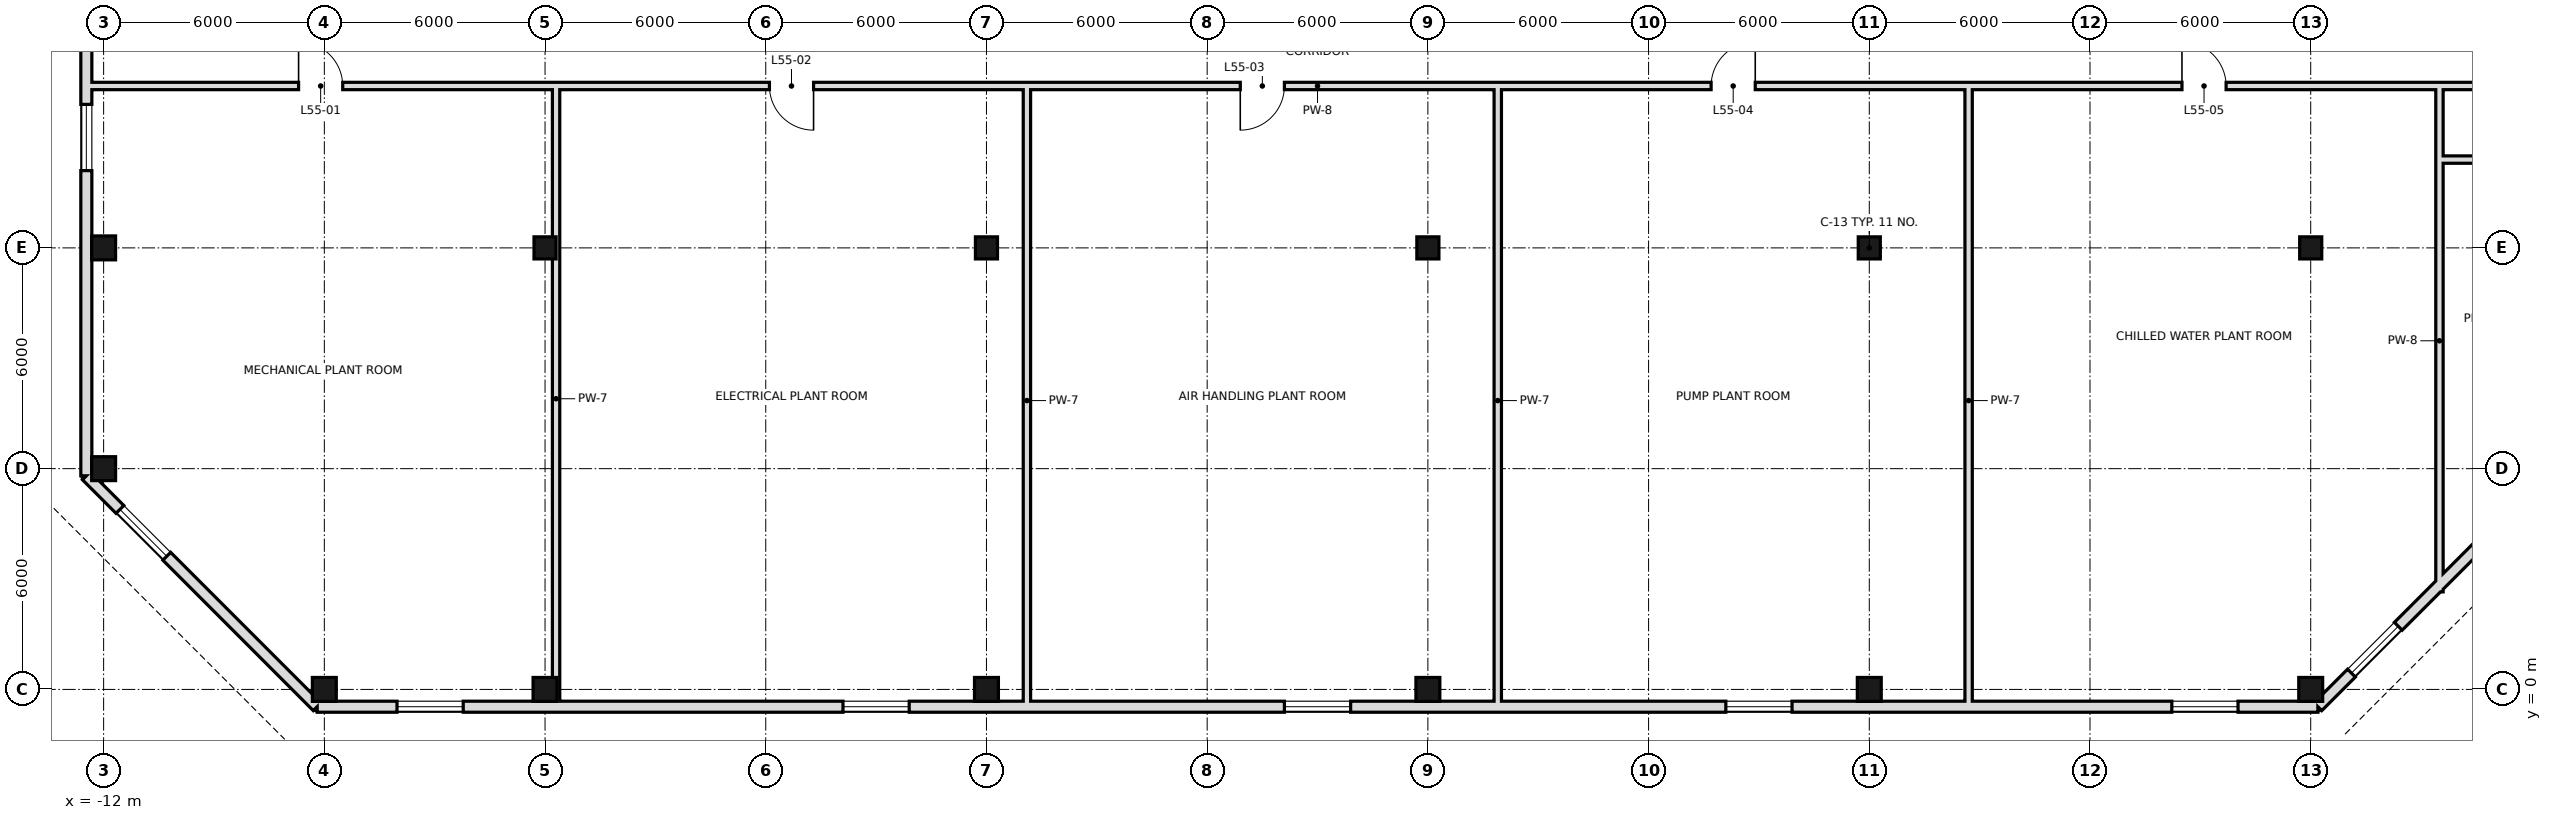
"""IFC4 building model, lengths in metres.
Left out: names, types, materials, properties, quantities, classifications, styles, units other than length and angle.
Written with IfcOpenShell. Run it as: python <this file> out.ifc"""

import sys

from ifc_helpers import new_model, si_unit, direction, frame, frame_2d, origin, origin_2d, place, context, subcontext, project, spatial, rectangle, hollow_rectangle, extrude, element, fill, save


model = new_model("IFC4")
c1 = context("Model", 3, precision=1e-05, world=origin(), true_north=direction((0.0, 1.0)))
c2 = subcontext(c1, "Body", "Model", "MODEL_VIEW")
j1 = project(units=[si_unit("LENGTHUNIT", "METRE"), si_unit("PLANEANGLEUNIT", "RADIAN")], contexts=[c1])
p1 = place(None, origin())
s1 = spatial("IfcSite", under=j1, at=p1, CompositionType="ELEMENT")
p2 = place(p1, origin())
s2 = spatial("IfcBuilding", under=s1, at=p2, CompositionType="ELEMENT")
p3 = place(p2, frame((0.0, 0.0, 234.2)))
s3 = spatial("IfcBuildingStorey", under=s2, at=p3, CompositionType="ELEMENT", Elevation=234.2)
for number, where, z_axis, x_axis in (
    (1, (-12.0, 6.0, 0.0), (0.0, 0.0, 1.0), (1.0, 0.0, 0.0)),
    (2, (-12.0, 12.0, 0.0), (0.0, 0.0, 1.0), (1.0, 0.0, 0.0)),
    (3, (-6.0, 0.0, 0.0), (0.0, 0.0, 1.0), (1.0, 0.0, 0.0)),
    (4, (0.0, 0.0, 0.0), (0.0, 0.0, 1.0), (1.0, 0.0, 0.0)),
):
    element("IfcColumn", number, at=place(p3, frame(where, z_axis=z_axis, x_axis=x_axis)), inside=s3, PredefinedType="COLUMN", context=c2, shape_type="SweptSolid", body=[
        extrude(hollow_rectangle(XDim=0.65, YDim=0.65, WallThickness=0.032, at=origin_2d()), origin(), (0.0, 0.0, 1.0), 5.4),
    ])
p4 = place(p3, frame((0.0, 12.0, 0.0), z_axis=(0.0, 0.0, 1.0), x_axis=(1.0, 0.0, 0.0)))
e5 = element("IfcColumn", 5, at=p4, inside=s3, PredefinedType="COLUMN", context=c2, shape_type="SweptSolid", body=[
    extrude(hollow_rectangle(XDim=0.6, YDim=0.6, WallThickness=0.028, at=origin_2d()), origin(), (0.0, 0.0, 1.0), 5.4),
])
p5 = place(p3, frame((12.0, 0.0, 0.0), z_axis=(0.0, 0.0, 1.0), x_axis=(1.0, 0.0, 0.0)))
e6 = element("IfcColumn", 6, at=p5, inside=s3, PredefinedType="COLUMN", context=c2, shape_type="SweptSolid", body=[
    extrude(hollow_rectangle(XDim=0.65, YDim=0.65, WallThickness=0.032, at=origin_2d()), origin(), (0.0, 0.0, 1.0), 5.4),
])
p6 = place(p3, frame((12.0, 12.0, 0.0), z_axis=(0.0, 0.0, 1.0), x_axis=(1.0, 0.0, 0.0)))
e7 = element("IfcColumn", 7, at=p6, inside=s3, PredefinedType="COLUMN", context=c2, shape_type="SweptSolid", body=[
    extrude(hollow_rectangle(XDim=0.6, YDim=0.6, WallThickness=0.028, at=origin_2d()), origin(), (0.0, 0.0, 1.0), 5.4),
])
p7 = place(p3, frame((24.0, 0.0, 0.0), z_axis=(0.0, 0.0, 1.0), x_axis=(1.0, 0.0, 0.0)))
e8 = element("IfcColumn", 8, at=p7, inside=s3, PredefinedType="COLUMN", context=c2, shape_type="SweptSolid", body=[
    extrude(hollow_rectangle(XDim=0.65, YDim=0.65, WallThickness=0.032, at=origin_2d()), origin(), (0.0, 0.0, 1.0), 5.4),
])
p8 = place(p3, frame((24.0, 12.0, 0.0), z_axis=(0.0, 0.0, 1.0), x_axis=(1.0, 0.0, 0.0)))
e9 = element("IfcColumn", 9, at=p8, inside=s3, PredefinedType="COLUMN", context=c2, shape_type="SweptSolid", body=[
    extrude(hollow_rectangle(XDim=0.6, YDim=0.6, WallThickness=0.028, at=origin_2d()), origin(), (0.0, 0.0, 1.0), 5.4),
])
p9 = place(p3, frame((36.0, 0.0, 0.0), z_axis=(0.0, 0.0, 1.0), x_axis=(1.0, 0.0, 0.0)))
e10 = element("IfcColumn", 10, at=p9, inside=s3, PredefinedType="COLUMN", context=c2, shape_type="SweptSolid", body=[
    extrude(hollow_rectangle(XDim=0.65, YDim=0.65, WallThickness=0.032, at=origin_2d()), origin(), (0.0, 0.0, 1.0), 5.4),
])
p10 = place(p3, frame((36.0, 12.0, 0.0), z_axis=(0.0, 0.0, 1.0), x_axis=(1.0, 0.0, 0.0)))
e11 = element("IfcColumn", 11, at=p10, inside=s3, PredefinedType="COLUMN", context=c2, shape_type="SweptSolid", body=[
    extrude(hollow_rectangle(XDim=0.6, YDim=0.6, WallThickness=0.028, at=origin_2d()), origin(), (0.0, 0.0, 1.0), 5.4),
])
p11 = place(p3, frame((48.0, 0.0, 0.0), z_axis=(0.0, 0.0, 1.0), x_axis=(1.0, 0.0, 0.0)))
e12 = element("IfcColumn", 12, at=p11, inside=s3, PredefinedType="COLUMN", context=c2, shape_type="SweptSolid", body=[
    extrude(hollow_rectangle(XDim=0.65, YDim=0.65, WallThickness=0.032, at=origin_2d()), origin(), (0.0, 0.0, 1.0), 5.4),
])
p12 = place(p3, frame((48.0, 12.0, 0.0), z_axis=(0.0, 0.0, 1.0), x_axis=(1.0, 0.0, 0.0)))
e13 = element("IfcColumn", 13, at=p12, inside=s3, PredefinedType="COLUMN", context=c2, shape_type="SweptSolid", body=[
    extrude(hollow_rectangle(XDim=0.6, YDim=0.6, WallThickness=0.028, at=origin_2d()), origin(), (0.0, 0.0, 1.0), 5.4),
])
p13 = place(p3, frame((-6.195, -0.47, 0.0), z_axis=(0.0, 0.0, 1.0), x_axis=(1.0, 0.0, 0.0)))
e14 = element("IfcWall", 14, at=p13, inside=s3, PredefinedType="SOLIDWALL", context=c2, shape_type="SweptSolid", body=[
    extrude(rectangle(XDim=54.389, YDim=0.3, at=frame_2d((27.195, 0.0))), origin(), (0.0, 0.0, 1.0), 5.22),
])
p14 = place(p13, frame((2.17, 0.0, 0.9)))
e15 = element("IfcOpeningElement", 15, at=p14, cuts=e14, PredefinedType="OPENING", context=c2, shape_type="SweptSolid", body=[
    extrude(rectangle(XDim=1.8, YDim=1.5, at=frame_2d((0.9, 0.75))), frame((0.0, 0.16, 0.0), z_axis=(0.0, -1.0, 0.0), x_axis=(1.0, 0.0, 0.0)), (0.0, 0.0, 1.0), 0.32),
])
p15 = place(p13, frame((14.295, 0.0, 0.9)))
e16 = element("IfcOpeningElement", 16, at=p15, cuts=e14, PredefinedType="OPENING", context=c2, shape_type="SweptSolid", body=[
    extrude(rectangle(XDim=1.8, YDim=1.5, at=frame_2d((0.9, 0.75))), frame((0.0, 0.16, 0.0), z_axis=(0.0, -1.0, 0.0), x_axis=(1.0, 0.0, 0.0)), (0.0, 0.0, 1.0), 0.32),
])
p16 = place(p13, frame((26.295, 0.0, 0.9)))
e17 = element("IfcOpeningElement", 17, at=p16, cuts=e14, PredefinedType="OPENING", context=c2, shape_type="SweptSolid", body=[
    extrude(rectangle(XDim=1.8, YDim=1.5, at=frame_2d((0.9, 0.75))), frame((0.0, 0.16, 0.0), z_axis=(0.0, -1.0, 0.0), x_axis=(1.0, 0.0, 0.0)), (0.0, 0.0, 1.0), 0.32),
])
p17 = place(p13, frame((38.295, 0.0, 0.9)))
e18 = element("IfcOpeningElement", 18, at=p17, cuts=e14, PredefinedType="OPENING", context=c2, shape_type="SweptSolid", body=[
    extrude(rectangle(XDim=1.8, YDim=1.5, at=frame_2d((0.9, 0.75))), frame((0.0, 0.16, 0.0), z_axis=(0.0, -1.0, 0.0), x_axis=(1.0, 0.0, 0.0)), (0.0, 0.0, 1.0), 0.32),
])
p18 = place(p13, frame((50.419, 0.0, 0.9)))
e19 = element("IfcOpeningElement", 19, at=p18, cuts=e14, PredefinedType="OPENING", context=c2, shape_type="SweptSolid", body=[
    extrude(rectangle(XDim=1.8, YDim=1.5, at=frame_2d((0.9, 0.75))), frame((0.0, 0.16, 0.0), z_axis=(0.0, -1.0, 0.0), x_axis=(1.0, 0.0, 0.0)), (0.0, 0.0, 1.0), 0.32),
])
p19 = place(p3, frame((48.195, -0.47, 0.0), z_axis=(0.0, 0.0, 1.0), x_axis=(0.707106781187, 0.707106781187, 0.0)))
e20 = element("IfcWall", 20, at=p19, inside=s3, PredefinedType="SOLIDWALL", context=c2, shape_type="SweptSolid", body=[
    extrude(rectangle(XDim=8.875, YDim=0.3, at=frame_2d((4.438, 0.0))), origin(), (0.0, 0.0, 1.0), 5.22),
])
p20 = place(p19, frame((1.292, 0.0, 0.9)))
e21 = element("IfcOpeningElement", 21, at=p20, cuts=e20, PredefinedType="OPENING", context=c2, shape_type="SweptSolid", body=[
    extrude(rectangle(XDim=1.8, YDim=1.5, at=frame_2d((0.9, 0.75))), frame((0.0, 0.16, 0.0), z_axis=(0.0, -1.0, 0.0), x_axis=(1.0, 0.0, 0.0)), (0.0, 0.0, 1.0), 0.32),
])
p21 = place(p3, frame((-12.47, 42.195, 0.0), z_axis=(0.0, 0.0, 1.0), x_axis=(0.0, -1.0, 0.0)))
e22 = element("IfcWall", 22, at=p21, inside=s3, PredefinedType="SOLIDWALL", context=c2, shape_type="SweptSolid", body=[
    extrude(rectangle(XDim=36.389, YDim=0.3, at=frame_2d((18.195, 0.0))), origin(), (0.0, 0.0, 1.0), 5.22),
])
p22 = place(p21, frame((2.17, 0.0, 0.9)))
e23 = element("IfcOpeningElement", 23, at=p22, cuts=e22, PredefinedType="OPENING", context=c2, shape_type="SweptSolid", body=[
    extrude(rectangle(XDim=1.8, YDim=1.5, at=frame_2d((0.9, 0.75))), frame((0.0, 0.16, 0.0), z_axis=(0.0, -1.0, 0.0), x_axis=(1.0, 0.0, 0.0)), (0.0, 0.0, 1.0), 0.32),
])
p23 = place(p21, frame((14.295, 0.0, 0.9)))
e24 = element("IfcOpeningElement", 24, at=p23, cuts=e22, PredefinedType="OPENING", context=c2, shape_type="SweptSolid", body=[
    extrude(rectangle(XDim=1.8, YDim=1.5, at=frame_2d((0.9, 0.75))), frame((0.0, 0.16, 0.0), z_axis=(0.0, -1.0, 0.0), x_axis=(1.0, 0.0, 0.0)), (0.0, 0.0, 1.0), 0.32),
])
p24 = place(p21, frame((26.295, 0.0, 0.9)))
e25 = element("IfcOpeningElement", 25, at=p24, cuts=e22, PredefinedType="OPENING", context=c2, shape_type="SweptSolid", body=[
    extrude(rectangle(XDim=1.8, YDim=1.5, at=frame_2d((0.9, 0.75))), frame((0.0, 0.16, 0.0), z_axis=(0.0, -1.0, 0.0), x_axis=(1.0, 0.0, 0.0)), (0.0, 0.0, 1.0), 0.32),
])
p25 = place(p3, frame((-12.47, 5.805, 0.0), z_axis=(0.0, 0.0, 1.0), x_axis=(0.707106781187, -0.707106781187, 0.0)))
e26 = element("IfcWall", 26, at=p25, inside=s3, PredefinedType="SOLIDWALL", context=c2, shape_type="SweptSolid", body=[
    extrude(rectangle(XDim=8.875, YDim=0.3, at=frame_2d((4.438, 0.0))), origin(), (0.0, 0.0, 1.0), 5.22),
])
p26 = place(p25, frame((1.292, 0.0, 0.9)))
e27 = element("IfcOpeningElement", 27, at=p26, cuts=e26, PredefinedType="OPENING", context=c2, shape_type="SweptSolid", body=[
    extrude(rectangle(XDim=1.8, YDim=1.5, at=frame_2d((0.9, 0.75))), frame((0.0, 0.16, 0.0), z_axis=(0.0, -1.0, 0.0), x_axis=(1.0, 0.0, 0.0)), (0.0, 0.0, 1.0), 0.32),
])
p27 = place(p3, frame((0.3, -0.5, 0.0), z_axis=(0.0, 0.0, 1.0), x_axis=(0.0, 1.0, 0.0)))
e28 = element("IfcWall", 28, at=p27, inside=s3, PredefinedType="SOLIDWALL", context=c2, shape_type="SweptSolid", body=[
    extrude(rectangle(XDim=16.8, YDim=0.2, at=frame_2d((8.4, 0.0))), origin(), (0.0, 0.0, 1.0), 5.22),
])
for number, where, z_axis, x_axis in (
    (29, (13.1, -0.6, 0.0), (0.0, 0.0, 1.0), (0.0, 1.0, 0.0)),
    (30, (25.9, -0.6, 0.0), (0.0, 0.0, 1.0), (0.0, 1.0, 0.0)),
    (31, (38.7, -0.6, 0.0), (0.0, 0.0, 1.0), (0.0, 1.0, 0.0)),
):
    element("IfcWall", number, at=place(p3, frame(where, z_axis=z_axis, x_axis=x_axis)), inside=s3, PredefinedType="SOLIDWALL", context=c2, shape_type="SweptSolid", body=[
        extrude(rectangle(XDim=16.9, YDim=0.2, at=frame_2d((8.45, 0.0))), origin(), (0.0, 0.0, 1.0), 4.52),
    ])
p28 = place(p3, frame((51.5, 2.651, 0.0), z_axis=(0.0, 0.0, 1.0), x_axis=(0.0, 1.0, 0.0)))
e32 = element("IfcWall", 32, at=p28, inside=s3, PredefinedType="SOLIDWALL", context=c2, shape_type="SweptSolid", body=[
    extrude(rectangle(XDim=13.649, YDim=0.2, at=frame_2d((6.825, 0.0))), origin(), (0.0, 0.0, 1.0), 4.77),
])
p29 = place(p3, frame((51.6, 14.4, 0.0), z_axis=(0.0, 0.0, 1.0), x_axis=(1.0, 0.0, 0.0)))
e33 = element("IfcWall", 33, at=p29, inside=s3, PredefinedType="SOLIDWALL", context=c2, shape_type="SweptSolid", body=[
    extrude(rectangle(XDim=3.0, YDim=0.2, at=frame_2d((1.5, 0.0))), origin(), (0.0, 0.0, 1.0), 4.52),
])
p30 = place(p29, frame((0.9, 0.0, 0.0)))
e34 = element("IfcOpeningElement", 34, at=p30, cuts=e33, PredefinedType="OPENING", context=c2, shape_type="SweptSolid", body=[
    extrude(rectangle(XDim=1.0, YDim=2.4, at=frame_2d((0.5, 1.2))), frame((0.0, 0.11, 0.0), z_axis=(0.0, -1.0, 0.0), x_axis=(1.0, 0.0, 0.0)), (0.0, 0.0, 1.0), 0.22),
])
p31 = place(p3, frame((-12.6, 16.4, 0.0), z_axis=(0.0, 0.0, 1.0), x_axis=(1.0, 0.0, 0.0)))
e35 = element("IfcWall", 35, at=p31, inside=s3, PredefinedType="SOLIDWALL", context=c2, shape_type="SweptSolid", body=[
    extrude(rectangle(XDim=67.2, YDim=0.2, at=frame_2d((33.6, 0.0))), origin(), (0.0, 0.0, 1.0), 4.52),
])
p32 = place(p31, frame((5.9, 0.0, 0.0)))
e36 = element("IfcOpeningElement", 36, at=p32, cuts=e35, PredefinedType="OPENING", context=c2, shape_type="SweptSolid", body=[
    extrude(rectangle(XDim=1.2, YDim=2.4, at=frame_2d((0.6, 1.2))), frame((0.0, 0.11, 0.0), z_axis=(0.0, -1.0, 0.0), x_axis=(1.0, 0.0, 0.0)), (0.0, 0.0, 1.0), 0.22),
])
p33 = place(p31, frame((18.7, 0.0, 0.0)))
e37 = element("IfcOpeningElement", 37, at=p33, cuts=e35, PredefinedType="OPENING", context=c2, shape_type="SweptSolid", body=[
    extrude(rectangle(XDim=1.2, YDim=2.4, at=frame_2d((0.6, 1.2))), frame((0.0, 0.11, 0.0), z_axis=(0.0, -1.0, 0.0), x_axis=(1.0, 0.0, 0.0)), (0.0, 0.0, 1.0), 0.22),
])
p34 = place(p31, frame((31.5, 0.0, 0.0)))
e38 = element("IfcOpeningElement", 38, at=p34, cuts=e35, PredefinedType="OPENING", context=c2, shape_type="SweptSolid", body=[
    extrude(rectangle(XDim=1.2, YDim=2.4, at=frame_2d((0.6, 1.2))), frame((0.0, 0.11, 0.0), z_axis=(0.0, -1.0, 0.0), x_axis=(1.0, 0.0, 0.0)), (0.0, 0.0, 1.0), 0.22),
])
p35 = place(p31, frame((44.3, 0.0, 0.0)))
e39 = element("IfcOpeningElement", 39, at=p35, cuts=e35, PredefinedType="OPENING", context=c2, shape_type="SweptSolid", body=[
    extrude(rectangle(XDim=1.2, YDim=2.4, at=frame_2d((0.6, 1.2))), frame((0.0, 0.11, 0.0), z_axis=(0.0, -1.0, 0.0), x_axis=(1.0, 0.0, 0.0)), (0.0, 0.0, 1.0), 0.22),
])
p36 = place(p31, frame((57.1, 0.0, 0.0)))
e40 = element("IfcOpeningElement", 40, at=p36, cuts=e35, PredefinedType="OPENING", context=c2, shape_type="SweptSolid", body=[
    extrude(rectangle(XDim=1.2, YDim=2.4, at=frame_2d((0.6, 1.2))), frame((0.0, 0.11, 0.0), z_axis=(0.0, -1.0, 0.0), x_axis=(1.0, 0.0, 0.0)), (0.0, 0.0, 1.0), 0.22),
])
p37 = place(p31, frame((65.1, 0.0, 0.0)))
e41 = element("IfcOpeningElement", 41, at=p37, cuts=e35, PredefinedType="OPENING", context=c2, shape_type="SweptSolid", body=[
    extrude(rectangle(XDim=1.0, YDim=2.4, at=frame_2d((0.5, 1.2))), frame((0.0, 0.11, 0.0), z_axis=(0.0, -1.0, 0.0), x_axis=(1.0, 0.0, 0.0)), (0.0, 0.0, 1.0), 0.22),
])
p38 = place(p14, origin())
e42 = element("IfcWindow", 42, at=p38, inside=s3, PartitioningType="SINGLE_PANEL", PredefinedType="WINDOW", context=c2, shape_type="SweptSolid", body=[
    extrude(rectangle(XDim=1.8, YDim=1.5, at=frame_2d((0.9, 0.75))), frame((0.0, 0.03, 0.0), z_axis=(0.0, -1.0, 0.0), x_axis=(1.0, 0.0, 0.0)), (0.0, 0.0, 1.0), 0.06),
])
fill(e15, e42)
p39 = place(p15, origin())
e43 = element("IfcWindow", 43, at=p39, inside=s3, PartitioningType="SINGLE_PANEL", PredefinedType="WINDOW", context=c2, shape_type="SweptSolid", body=[
    extrude(rectangle(XDim=1.8, YDim=1.5, at=frame_2d((0.9, 0.75))), frame((0.0, 0.03, 0.0), z_axis=(0.0, -1.0, 0.0), x_axis=(1.0, 0.0, 0.0)), (0.0, 0.0, 1.0), 0.06),
])
fill(e16, e43)
p40 = place(p16, origin())
e44 = element("IfcWindow", 44, at=p40, inside=s3, PartitioningType="SINGLE_PANEL", PredefinedType="WINDOW", context=c2, shape_type="SweptSolid", body=[
    extrude(rectangle(XDim=1.8, YDim=1.5, at=frame_2d((0.9, 0.75))), frame((0.0, 0.03, 0.0), z_axis=(0.0, -1.0, 0.0), x_axis=(1.0, 0.0, 0.0)), (0.0, 0.0, 1.0), 0.06),
])
fill(e17, e44)
p41 = place(p17, origin())
e45 = element("IfcWindow", 45, at=p41, inside=s3, PartitioningType="SINGLE_PANEL", PredefinedType="WINDOW", context=c2, shape_type="SweptSolid", body=[
    extrude(rectangle(XDim=1.8, YDim=1.5, at=frame_2d((0.9, 0.75))), frame((0.0, 0.03, 0.0), z_axis=(0.0, -1.0, 0.0), x_axis=(1.0, 0.0, 0.0)), (0.0, 0.0, 1.0), 0.06),
])
fill(e18, e45)
p42 = place(p18, origin())
e46 = element("IfcWindow", 46, at=p42, inside=s3, PartitioningType="SINGLE_PANEL", PredefinedType="WINDOW", context=c2, shape_type="SweptSolid", body=[
    extrude(rectangle(XDim=1.8, YDim=1.5, at=frame_2d((0.9, 0.75))), frame((0.0, 0.03, 0.0), z_axis=(0.0, -1.0, 0.0), x_axis=(1.0, 0.0, 0.0)), (0.0, 0.0, 1.0), 0.06),
])
fill(e19, e46)
p43 = place(p20, origin())
e47 = element("IfcWindow", 47, at=p43, inside=s3, PartitioningType="SINGLE_PANEL", PredefinedType="WINDOW", context=c2, shape_type="SweptSolid", body=[
    extrude(rectangle(XDim=1.8, YDim=1.5, at=frame_2d((0.9, 0.75))), frame((0.0, 0.03, 0.0), z_axis=(0.0, -1.0, 0.0), x_axis=(1.0, 0.0, 0.0)), (0.0, 0.0, 1.0), 0.06),
])
fill(e21, e47)
p44 = place(p24, origin())
e48 = element("IfcWindow", 48, at=p44, inside=s3, PartitioningType="SINGLE_PANEL", PredefinedType="WINDOW", context=c2, shape_type="SweptSolid", body=[
    extrude(rectangle(XDim=1.8, YDim=1.5, at=frame_2d((0.9, 0.75))), frame((0.0, 0.03, 0.0), z_axis=(0.0, -1.0, 0.0), x_axis=(1.0, 0.0, 0.0)), (0.0, 0.0, 1.0), 0.06),
])
fill(e25, e48)
p45 = place(p26, origin())
e49 = element("IfcWindow", 49, at=p45, inside=s3, PartitioningType="SINGLE_PANEL", PredefinedType="WINDOW", context=c2, shape_type="SweptSolid", body=[
    extrude(rectangle(XDim=1.8, YDim=1.5, at=frame_2d((0.9, 0.75))), frame((0.0, 0.03, 0.0), z_axis=(0.0, -1.0, 0.0), x_axis=(1.0, 0.0, 0.0)), (0.0, 0.0, 1.0), 0.06),
])
fill(e27, e49)
p46 = place(p32, origin())
e50 = element("IfcDoor", 50, at=p46, inside=s3, OperationType="SINGLE_SWING_LEFT", PredefinedType="DOOR", context=c2, shape_type="SweptSolid", body=[
    extrude(rectangle(XDim=1.2, YDim=2.4, at=frame_2d((0.6, 1.2))), frame((0.0, 0.025, 0.0), z_axis=(0.0, -1.0, 0.0), x_axis=(1.0, 0.0, 0.0)), (0.0, 0.0, 1.0), 0.05),
])
fill(e36, e50)
p47 = place(p33, origin())
e51 = element("IfcDoor", 51, at=p47, inside=s3, OperationType="SINGLE_SWING_RIGHT", PredefinedType="DOOR", context=c2, shape_type="SweptSolid", body=[
    extrude(rectangle(XDim=1.2, YDim=2.4, at=frame_2d((0.6, 1.2))), frame((0.0, 0.025, 0.0), z_axis=(0.0, -1.0, 0.0), x_axis=(1.0, 0.0, 0.0)), (0.0, 0.0, 1.0), 0.05),
])
fill(e37, e51)
p48 = place(p34, frame((1.2, 0.0, 0.0), z_axis=(0.0, 0.0, 1.0), x_axis=(-1.0, 0.0, 0.0)))
e52 = element("IfcDoor", 52, at=p48, inside=s3, OperationType="SINGLE_SWING_RIGHT", PredefinedType="DOOR", context=c2, shape_type="SweptSolid", body=[
    extrude(rectangle(XDim=1.2, YDim=2.4, at=frame_2d((0.6, 1.2))), frame((0.0, 0.025, 0.0), z_axis=(0.0, -1.0, 0.0), x_axis=(1.0, 0.0, 0.0)), (0.0, 0.0, 1.0), 0.05),
])
fill(e38, e52)
p49 = place(p35, frame((1.2, 0.0, 0.0), z_axis=(0.0, 0.0, 1.0), x_axis=(-1.0, 0.0, 0.0)))
e53 = element("IfcDoor", 53, at=p49, inside=s3, OperationType="SINGLE_SWING_LEFT", PredefinedType="DOOR", context=c2, shape_type="SweptSolid", body=[
    extrude(rectangle(XDim=1.2, YDim=2.4, at=frame_2d((0.6, 1.2))), frame((0.0, 0.025, 0.0), z_axis=(0.0, -1.0, 0.0), x_axis=(1.0, 0.0, 0.0)), (0.0, 0.0, 1.0), 0.05),
])
fill(e39, e53)
p50 = place(p36, origin())
e54 = element("IfcDoor", 54, at=p50, inside=s3, OperationType="SINGLE_SWING_LEFT", PredefinedType="DOOR", context=c2, shape_type="SweptSolid", body=[
    extrude(rectangle(XDim=1.2, YDim=2.4, at=frame_2d((0.6, 1.2))), frame((0.0, 0.025, 0.0), z_axis=(0.0, -1.0, 0.0), x_axis=(1.0, 0.0, 0.0)), (0.0, 0.0, 1.0), 0.05),
])
fill(e40, e54)
save(model, sys.argv[1])
